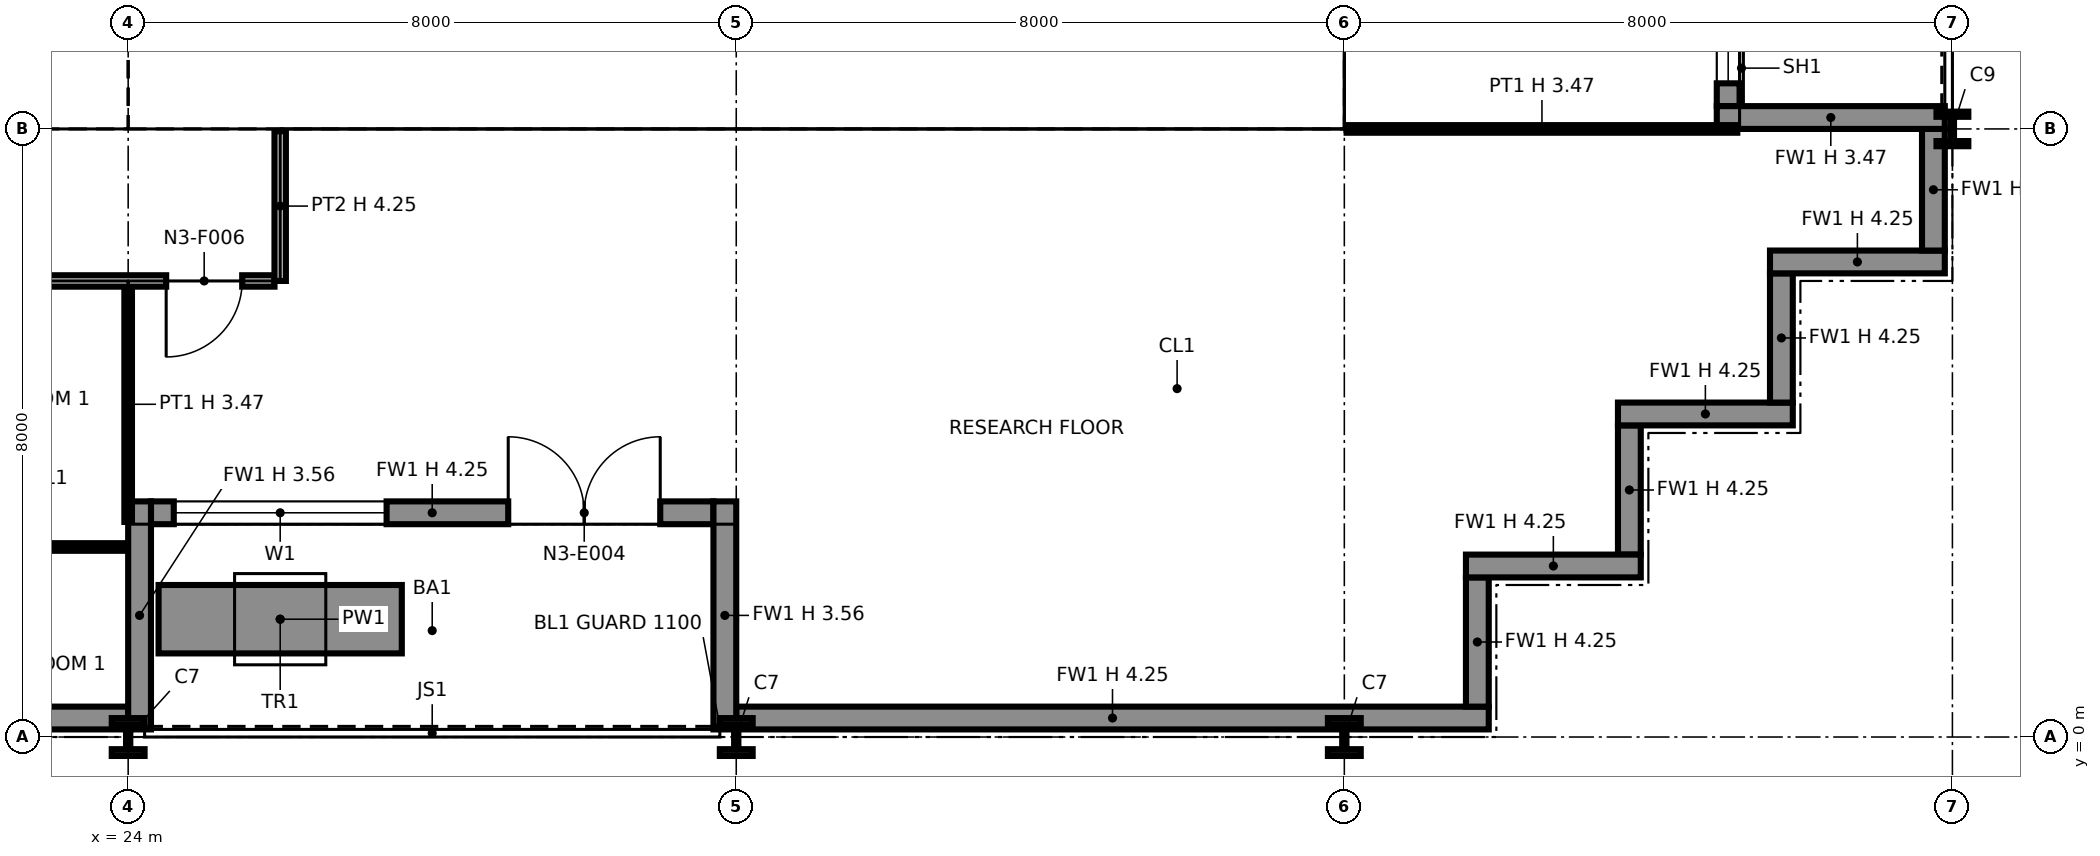
"""IFC4 building model, lengths in metres.
Left out: names, types, materials, properties, quantities, classifications, styles, units other than length and angle.
Written with IfcOpenShell. Run it as: python <this file> out.ifc"""

import sys

from ifc_helpers import new_model, si_unit, direction, frame, frame_2d, origin, origin_2d, place, context, subcontext, project, spatial, polyline, rectangle, i_section, outline, extrude, element, fill, save


model = new_model("IFC4")
c1 = context("Model", 3, precision=1e-05, world=origin(), true_north=direction((0.0, 1.0)))
c2 = subcontext(c1, "Body", "Model", "MODEL_VIEW")
j1 = project(units=[si_unit("LENGTHUNIT", "METRE"), si_unit("PLANEANGLEUNIT", "RADIAN")], contexts=[c1])
p1 = place(None, origin())
s1 = spatial("IfcSite", under=j1, at=p1, CompositionType="ELEMENT")
p2 = place(p1, origin())
s2 = spatial("IfcBuilding", under=s1, at=p2, CompositionType="ELEMENT")
p3 = place(p2, frame((0.0, 0.0, 70.0)))
s3 = spatial("IfcBuildingStorey", under=s2, at=p3, CompositionType="ELEMENT", Elevation=70.0)
p4 = place(p3, frame((24.0, 0.0, 0.0), z_axis=(0.0, 0.0, 1.0), x_axis=(1.0, 0.0, 0.0)))
e1 = element("IfcColumn", 1, at=p4, inside=s3, PredefinedType="COLUMN", context=c2, shape_type="SweptSolid", body=[
    extrude(i_section(OverallWidth=0.432, OverallDepth=0.498, WebThickness=0.056, FlangeThickness=0.089, at=origin_2d()), origin(), (0.0, 0.0, 1.0), 4.25),
])
p5 = place(p3, frame((24.0, 8.0, 0.0), z_axis=(0.0, 0.0, 1.0), x_axis=(1.0, 0.0, 0.0)))
e2 = element("IfcColumn", 2, at=p5, inside=s3, PredefinedType="COLUMN", context=c2, shape_type="SweptSolid", body=[
    extrude(i_section(OverallWidth=0.411, OverallDepth=0.434, WebThickness=0.036, FlangeThickness=0.057, at=origin_2d()), origin(), (0.0, 0.0, 1.0), 4.25),
])
p6 = place(p3, frame((32.0, 0.0, 0.0), z_axis=(0.0, 0.0, 1.0), x_axis=(1.0, 0.0, 0.0)))
e3 = element("IfcColumn", 3, at=p6, inside=s3, PredefinedType="COLUMN", context=c2, shape_type="SweptSolid", body=[
    extrude(i_section(OverallWidth=0.432, OverallDepth=0.498, WebThickness=0.056, FlangeThickness=0.089, at=origin_2d()), origin(), (0.0, 0.0, 1.0), 4.25),
])
p7 = place(p3, frame((32.0, 8.0, 0.0), z_axis=(0.0, 0.0, 1.0), x_axis=(1.0, 0.0, 0.0)))
e4 = element("IfcColumn", 4, at=p7, inside=s3, PredefinedType="COLUMN", context=c2, shape_type="SweptSolid", body=[
    extrude(i_section(OverallWidth=0.406, OverallDepth=0.417, WebThickness=0.03, FlangeThickness=0.048, at=origin_2d()), origin(), (0.0, 0.0, 1.0), 4.25),
])
p8 = place(p3, frame((40.0, 0.0, 0.0), z_axis=(0.0, 0.0, 1.0), x_axis=(1.0, 0.0, 0.0)))
e5 = element("IfcColumn", 5, at=p8, inside=s3, PredefinedType="COLUMN", context=c2, shape_type="SweptSolid", body=[
    extrude(i_section(OverallWidth=0.432, OverallDepth=0.498, WebThickness=0.056, FlangeThickness=0.089, at=origin_2d()), origin(), (0.0, 0.0, 1.0), 4.25),
])
p9 = place(p3, frame((40.0, 8.0, 0.0), z_axis=(0.0, 0.0, 1.0), x_axis=(1.0, 0.0, 0.0)))
e6 = element("IfcColumn", 6, at=p9, inside=s3, PredefinedType="COLUMN", context=c2, shape_type="SweptSolid", body=[
    extrude(i_section(OverallWidth=0.406, OverallDepth=0.417, WebThickness=0.03, FlangeThickness=0.048, at=origin_2d()), origin(), (0.0, 0.0, 1.0), 4.25),
])
p10 = place(p3, frame((48.0, 8.0, 0.0), z_axis=(0.0, 0.0, 1.0), x_axis=(1.0, 0.0, 0.0)))
e7 = element("IfcColumn", 7, at=p10, inside=s3, PredefinedType="COLUMN", context=c2, shape_type="SweptSolid", body=[
    extrude(i_section(OverallWidth=0.419, OverallDepth=0.455, WebThickness=0.042, FlangeThickness=0.068, at=origin_2d()), origin(), (0.0, 0.0, 1.0), 4.25),
])
p11 = place(p3, frame((16.0, 0.25, 0.0), z_axis=(0.0, 0.0, 1.0), x_axis=(1.0, 0.0, 0.0)))
e8 = element("IfcWall", 8, at=p11, inside=s3, PredefinedType="SOLIDWALL", context=c2, shape_type="SweptSolid", body=[
    extrude(rectangle(XDim=8.0, YDim=0.3, at=frame_2d((4.0, 0.0))), origin(), (0.0, 0.0, 1.0), 4.25),
])
p12 = place(p3, frame((24.3, 2.95, 0.0), z_axis=(0.0, 0.0, 1.0), x_axis=(1.0, 0.0, 0.0)))
e9 = element("IfcWall", 9, at=p12, inside=s3, PredefinedType="SOLIDWALL", context=c2, shape_type="SweptSolid", body=[
    extrude(rectangle(XDim=7.4, YDim=0.3, at=frame_2d((3.7, 0.0))), origin(), (0.0, 0.0, 1.0), 4.25),
])
p13 = place(p12, frame((0.3, 0.0, 0.9)))
e10 = element("IfcOpeningElement", 10, at=p13, cuts=e9, PredefinedType="OPENING", context=c2, shape_type="SweptSolid", body=[
    extrude(rectangle(XDim=2.8, YDim=2.2, at=frame_2d((1.4, 1.1))), frame((0.0, 0.16, 0.0), z_axis=(0.0, -1.0, 0.0), x_axis=(1.0, 0.0, 0.0)), (0.0, 0.0, 1.0), 0.32),
])
p14 = place(p12, frame((4.7, 0.0, 0.0)))
e11 = element("IfcOpeningElement", 11, at=p14, cuts=e9, PredefinedType="OPENING", context=c2, shape_type="SweptSolid", body=[
    extrude(rectangle(XDim=2.0, YDim=2.4, at=frame_2d((1.0, 1.2))), frame((0.0, 0.16, 0.0), z_axis=(0.0, -1.0, 0.0), x_axis=(1.0, 0.0, 0.0)), (0.0, 0.0, 1.0), 0.32),
])
for number, where, z_axis, x_axis in (
    (12, (24.15, 0.1, 0.0), (0.0, 0.0, 1.0), (0.0, 1.0, 0.0)),
    (13, (31.85, 0.1, 0.0), (0.0, 0.0, 1.0), (0.0, 1.0, 0.0)),
):
    element("IfcWall", number, at=place(p3, frame(where, z_axis=z_axis, x_axis=x_axis)), inside=s3, PredefinedType="SOLIDWALL", context=c2, shape_type="SweptSolid", body=[
        extrude(rectangle(XDim=3.0, YDim=0.3, at=frame_2d((1.5, 0.0))), origin(), (0.0, 0.0, 1.0), 3.556),
    ])
p15 = place(p3, frame((32.0, 0.25, 0.0), z_axis=(0.0, 0.0, 1.0), x_axis=(1.0, 0.0, 0.0)))
e14 = element("IfcWall", 14, at=p15, inside=s3, PredefinedType="SOLIDWALL", context=c2, shape_type="SweptSolid", body=[
    extrude(rectangle(XDim=9.9, YDim=0.3, at=frame_2d((4.95, 0.0))), origin(), (0.0, 0.0, 1.0), 4.25),
])
p16 = place(p3, frame((24.4, 1.55, 0.0), z_axis=(0.0, 0.0, 1.0), x_axis=(1.0, 0.0, 0.0)))
e15 = element("IfcWall", 15, at=p16, inside=s3, PredefinedType="SOLIDWALL", context=c2, shape_type="SweptSolid", body=[
    extrude(rectangle(XDim=3.2, YDim=0.9, at=frame_2d((1.6, 0.0))), origin(), (0.0, 0.0, 1.0), 0.6),
])
p17 = place(p3, frame((41.75, 0.4, 0.0), z_axis=(0.0, 0.0, 1.0), x_axis=(0.0, 1.0, 0.0)))
e16 = element("IfcWall", 16, at=p17, inside=s3, PredefinedType="SOLIDWALL", context=c2, shape_type="SweptSolid", body=[
    extrude(rectangle(XDim=1.7, YDim=0.3, at=frame_2d((0.85, 0.0))), origin(), (0.0, 0.0, 1.0), 4.25),
])
p18 = place(p3, frame((41.6, 2.25, 0.0), z_axis=(0.0, 0.0, 1.0), x_axis=(1.0, 0.0, 0.0)))
e17 = element("IfcWall", 17, at=p18, inside=s3, PredefinedType="SOLIDWALL", context=c2, shape_type="SweptSolid", body=[
    extrude(rectangle(XDim=2.3, YDim=0.3, at=frame_2d((1.15, 0.0))), origin(), (0.0, 0.0, 1.0), 4.25),
])
p19 = place(p3, frame((43.75, 2.4, 0.0), z_axis=(0.0, 0.0, 1.0), x_axis=(0.0, 1.0, 0.0)))
e18 = element("IfcWall", 18, at=p19, inside=s3, PredefinedType="SOLIDWALL", context=c2, shape_type="SweptSolid", body=[
    extrude(rectangle(XDim=1.7, YDim=0.3, at=frame_2d((0.85, 0.0))), origin(), (0.0, 0.0, 1.0), 4.25),
])
p20 = place(p3, frame((43.6, 4.25, 0.0), z_axis=(0.0, 0.0, 1.0), x_axis=(1.0, 0.0, 0.0)))
e19 = element("IfcWall", 19, at=p20, inside=s3, PredefinedType="SOLIDWALL", context=c2, shape_type="SweptSolid", body=[
    extrude(rectangle(XDim=2.3, YDim=0.3, at=frame_2d((1.15, 0.0))), origin(), (0.0, 0.0, 1.0), 4.25),
])
p21 = place(p3, frame((45.75, 4.4, 0.0), z_axis=(0.0, 0.0, 1.0), x_axis=(0.0, 1.0, 0.0)))
e20 = element("IfcWall", 20, at=p21, inside=s3, PredefinedType="SOLIDWALL", context=c2, shape_type="SweptSolid", body=[
    extrude(rectangle(XDim=1.7, YDim=0.3, at=frame_2d((0.85, 0.0))), origin(), (0.0, 0.0, 1.0), 4.25),
])
p22 = place(p3, frame((45.6, 6.25, 0.0), z_axis=(0.0, 0.0, 1.0), x_axis=(1.0, 0.0, 0.0)))
e21 = element("IfcWall", 21, at=p22, inside=s3, PredefinedType="SOLIDWALL", context=c2, shape_type="SweptSolid", body=[
    extrude(rectangle(XDim=2.3, YDim=0.3, at=frame_2d((1.15, 0.0))), origin(), (0.0, 0.0, 1.0), 4.25),
])
p23 = place(p3, frame((47.75, 6.4, 0.0), z_axis=(0.0, 0.0, 1.0), x_axis=(0.0, 1.0, 0.0)))
e22 = element("IfcWall", 22, at=p23, inside=s3, PredefinedType="SOLIDWALL", context=c2, shape_type="SweptSolid", body=[
    extrude(rectangle(XDim=1.6, YDim=0.3, at=frame_2d((0.8, 0.0))), origin(), (0.0, 0.0, 1.0), 4.25),
])
p24 = place(p3, frame((45.05, 8.3, 0.0), z_axis=(0.0, 0.0, 1.0), x_axis=(0.0, 1.0, 0.0)))
e23 = element("IfcWall", 23, at=p24, inside=s3, PredefinedType="SOLIDWALL", context=c2, shape_type="SweptSolid", body=[
    extrude(rectangle(XDim=7.4, YDim=0.3, at=frame_2d((3.7, 0.0))), origin(), (0.0, 0.0, 1.0), 4.25),
])
p25 = place(p24, frame((0.3, 0.0, 0.9)))
e24 = element("IfcOpeningElement", 24, at=p25, cuts=e23, PredefinedType="OPENING", context=c2, shape_type="SweptSolid", body=[
    extrude(rectangle(XDim=2.8, YDim=2.2, at=frame_2d((1.4, 1.1))), frame((0.0, 0.16, 0.0), z_axis=(0.0, -1.0, 0.0), x_axis=(1.0, 0.0, 0.0)), (0.0, 0.0, 1.0), 0.32),
])
p26 = place(p24, frame((4.7, 0.0, 0.0)))
e25 = element("IfcOpeningElement", 25, at=p26, cuts=e23, PredefinedType="OPENING", context=c2, shape_type="SweptSolid", body=[
    extrude(rectangle(XDim=2.0, YDim=2.4, at=frame_2d((1.0, 1.2))), frame((0.0, 0.16, 0.0), z_axis=(0.0, -1.0, 0.0), x_axis=(1.0, 0.0, 0.0)), (0.0, 0.0, 1.0), 0.32),
])
p27 = place(p3, frame((47.9, 8.15, 0.0), z_axis=(0.0, 0.0, 1.0), x_axis=(-1.0, 0.0, 0.0)))
e26 = element("IfcWall", 26, at=p27, inside=s3, PredefinedType="SOLIDWALL", context=c2, shape_type="SweptSolid", body=[
    extrude(rectangle(XDim=3.0, YDim=0.3, at=frame_2d((1.5, 0.0))), origin(), (0.0, 0.0, 1.0), 3.469),
])
p28 = place(p3, frame((8.65, 8.75, 0.0), z_axis=(0.0, 0.0, 1.0), x_axis=(1.0, 0.0, 0.0)))
e27 = element("IfcWall", 27, at=p28, inside=s3, PredefinedType="PARTITIONING", context=c2, shape_type="SweptSolid", body=[
    extrude(outline(polyline([(0.0, 0.0), (14.7, 0.0), (14.7, 4.25), (7.469, 4.25), (7.469, 3.632), (7.231, 3.632), (7.23, 4.25), (0.0, 4.25), (0.0, 0.0)])), frame((0.0, 0.1, 0.0), z_axis=(0.0, -1.0, 0.0), x_axis=(1.0, 0.0, 0.0)), (0.0, 0.0, 1.0), 0.2),
])
p29 = place(p28, frame((1.3, 0.0, 0.0)))
e28 = element("IfcOpeningElement", 28, at=p29, cuts=e27, PredefinedType="OPENING", context=c2, shape_type="SweptSolid", body=[
    extrude(rectangle(XDim=1.4, YDim=2.1, at=frame_2d((0.7, 1.05))), frame((0.0, 0.11, 0.0), z_axis=(0.0, -1.0, 0.0), x_axis=(1.0, 0.0, 0.0)), (0.0, 0.0, 1.0), 0.22),
])
p30 = place(p28, frame((4.6, 0.0, 0.0)))
e29 = element("IfcOpeningElement", 29, at=p30, cuts=e27, PredefinedType="OPENING", context=c2, shape_type="SweptSolid", body=[
    extrude(rectangle(XDim=1.4, YDim=2.1, at=frame_2d((0.7, 1.05))), frame((0.0, 0.11, 0.0), z_axis=(0.0, -1.0, 0.0), x_axis=(1.0, 0.0, 0.0)), (0.0, 0.0, 1.0), 0.22),
])
p31 = place(p28, frame((10.4, 0.0, 0.0)))
e30 = element("IfcOpeningElement", 30, at=p31, cuts=e27, PredefinedType="OPENING", context=c2, shape_type="SweptSolid", body=[
    extrude(rectangle(XDim=1.2, YDim=2.1, at=frame_2d((0.6, 1.05))), frame((0.0, 0.11, 0.0), z_axis=(0.0, -1.0, 0.0), x_axis=(1.0, 0.0, 0.0)), (0.0, 0.0, 1.0), 0.22),
])
p32 = place(p3, frame((23.25, 8.85, 0.0), z_axis=(0.0, 0.0, 1.0), x_axis=(0.0, 1.0, 0.0)))
e31 = element("IfcWall", 31, at=p32, inside=s3, PredefinedType="PARTITIONING", context=c2, shape_type="SweptSolid", body=[
    extrude(outline(polyline([(0.0, 0.0), (14.3, 0.0), (14.3, 4.25), (11.231, 4.25), (11.23, 3.789), (11.07, 3.789), (11.069, 4.25), (7.27, 4.25), (7.269, 3.632), (7.031, 3.632), (7.031, 4.25), (1.231, 4.25), (1.23, 3.789), (1.07, 3.789), (1.069, 4.25), (0.0, 4.25), (0.0, 0.0)])), frame((0.0, 0.1, 0.0), z_axis=(0.0, -1.0, 0.0), x_axis=(1.0, 0.0, 0.0)), (0.0, 0.0, 1.0), 0.2),
])
p33 = place(p32, frame((8.3, 0.0, 0.0)))
e32 = element("IfcOpeningElement", 32, at=p33, cuts=e31, PredefinedType="OPENING", context=c2, shape_type="SweptSolid", body=[
    extrude(rectangle(XDim=1.8, YDim=2.1, at=frame_2d((0.9, 1.05))), frame((0.0, 0.11, 0.0), z_axis=(0.0, -1.0, 0.0), x_axis=(1.0, 0.0, 0.0)), (0.0, 0.0, 1.0), 0.22),
])
p34 = place(p3, frame((24.65, 8.75, 0.0), z_axis=(0.0, 0.0, 1.0), x_axis=(1.0, 0.0, 0.0)))
e33 = element("IfcWall", 33, at=p34, inside=s3, PredefinedType="PARTITIONING", context=c2, shape_type="SweptSolid", body=[
    extrude(outline(polyline([(0.0, 0.0), (14.7, 0.0), (14.7, 4.25), (7.469, 4.25), (7.469, 3.632), (7.231, 3.632), (7.23, 4.25), (0.0, 4.25), (0.0, 0.0)])), frame((0.0, 0.1, 0.0), z_axis=(0.0, -1.0, 0.0), x_axis=(1.0, 0.0, 0.0)), (0.0, 0.0, 1.0), 0.2),
])
p35 = place(p3, frame((24.75, 8.85, 0.0), z_axis=(0.0, 0.0, 1.0), x_axis=(0.0, 1.0, 0.0)))
e34 = element("IfcWall", 34, at=p35, inside=s3, PredefinedType="PARTITIONING", context=c2, shape_type="SweptSolid", body=[
    extrude(outline(polyline([(0.0, 0.0), (6.3, 0.0), (6.3, 4.25), (3.231, 4.25), (3.23, 3.789), (3.07, 3.789), (3.069, 4.25), (0.0, 4.25), (0.0, 0.0)])), frame((0.0, 0.1, 0.0), z_axis=(0.0, -1.0, 0.0), x_axis=(1.0, 0.0, 0.0)), (0.0, 0.0, 1.0), 0.2),
])
for number, where, z_axis, x_axis in (
    (35, (27.075, 8.85, 0.0), (0.0, 0.0, 1.0), (0.0, 1.0, 0.0)),
    (36, (29.225, 8.85, 0.0), (0.0, 0.0, 1.0), (0.0, 1.0, 0.0)),
):
    element("IfcWall", number, at=place(p3, frame(where, z_axis=z_axis, x_axis=x_axis)), inside=s3, PredefinedType="PARTITIONING", context=c2, shape_type="SweptSolid", body=[
        extrude(rectangle(XDim=3.0, YDim=0.15, at=frame_2d((1.5, 0.0))), origin(), (0.0, 0.0, 1.0), 4.25),
    ])
p36 = place(p3, frame((32.0, 8.85, 0.0), z_axis=(0.0, 0.0, 1.0), x_axis=(0.0, 1.0, 0.0)))
e37 = element("IfcWall", 37, at=p36, inside=s3, PredefinedType="PARTITIONING", context=c2, shape_type="SweptSolid", body=[
    extrude(rectangle(XDim=3.0, YDim=0.6, at=frame_2d((1.5, 0.0))), origin(), (0.0, 0.0, 1.0), 3.632),
])
for number, where, z_axis, x_axis in (
    (38, (35.6, 8.85, 0.0), (0.0, 0.0, 1.0), (0.0, 1.0, 0.0)),
    (39, (39.25, 8.85, 0.0), (0.0, 0.0, 1.0), (0.0, 1.0, 0.0)),
):
    element("IfcWall", number, at=place(p3, frame(where, z_axis=z_axis, x_axis=x_axis)), inside=s3, PredefinedType="PARTITIONING", context=c2, shape_type="SweptSolid", body=[
        extrude(rectangle(XDim=6.3, YDim=0.2, at=frame_2d((3.15, 0.0))), origin(), (0.0, 0.0, 1.0), 4.25),
    ])
p37 = place(p3, frame((20.05, 2.5, 0.0), z_axis=(0.0, 0.0, 1.0), x_axis=(1.0, 0.0, 0.0)))
e40 = element("IfcWall", 40, at=p37, inside=s3, PredefinedType="PARTITIONING", context=c2, shape_type="SweptSolid", body=[
    extrude(rectangle(XDim=3.92, YDim=0.1, at=frame_2d((1.96, 0.0))), origin(), (0.0, 0.0, 1.0), 4.25),
])
p38 = place(p37, frame((1.45, 0.0, 0.0)))
e41 = element("IfcOpeningElement", 41, at=p38, cuts=e40, PredefinedType="OPENING", context=c2, shape_type="SweptSolid", body=[
    extrude(rectangle(XDim=1.0, YDim=2.1, at=frame_2d((0.5, 1.05))), frame((0.0, 0.06, 0.0), z_axis=(0.0, -1.0, 0.0), x_axis=(1.0, 0.0, 0.0)), (0.0, 0.0, 1.0), 0.12),
])
p39 = place(p3, frame((24.0, 2.83, 0.0), z_axis=(0.0, 0.0, 1.0), x_axis=(0.0, 1.0, 0.0)))
e42 = element("IfcWall", 42, at=p39, inside=s3, PredefinedType="PARTITIONING", context=c2, shape_type="SweptSolid", body=[
    extrude(rectangle(XDim=3.095, YDim=0.1, at=frame_2d((1.547, 0.0))), origin(), (0.0, 0.0, 1.0), 3.47),
])
p40 = place(p3, frame((6.075, 6.0, 0.0), z_axis=(0.0, 0.0, 1.0), x_axis=(1.0, 0.0, 0.0)))
e43 = element("IfcWall", 43, at=p40, inside=s3, PredefinedType="PARTITIONING", context=c2, shape_type="SweptSolid", body=[
    extrude(rectangle(XDim=19.85, YDim=0.15, at=frame_2d((9.925, 0.0))), origin(), (0.0, 0.0, 1.0), 4.25),
])
p41 = place(p40, frame((12.425, 0.0, 0.0), z_axis=(0.0, 0.0, 1.0), x_axis=(-1.0, 0.0, 0.0)))
e44 = element("IfcOpeningElement", 44, at=p41, cuts=e43, PredefinedType="OPENING", context=c2, shape_type="SweptSolid", body=[
    extrude(rectangle(XDim=1.0, YDim=2.1, at=frame_2d((0.5, 1.05))), frame((0.0, 0.085, 0.0), z_axis=(0.0, -1.0, 0.0), x_axis=(1.0, 0.0, 0.0)), (0.0, 0.0, 1.0), 0.17),
])
p42 = place(p40, frame((16.425, 0.0, 0.0), z_axis=(0.0, 0.0, 1.0), x_axis=(-1.0, 0.0, 0.0)))
e45 = element("IfcOpeningElement", 45, at=p42, cuts=e43, PredefinedType="OPENING", context=c2, shape_type="SweptSolid", body=[
    extrude(rectangle(XDim=1.0, YDim=2.1, at=frame_2d((0.5, 1.05))), frame((0.0, 0.085, 0.0), z_axis=(0.0, -1.0, 0.0), x_axis=(1.0, 0.0, 0.0)), (0.0, 0.0, 1.0), 0.17),
])
p43 = place(p40, frame((4.425, 0.0, 0.0), z_axis=(0.0, 0.0, 1.0), x_axis=(-1.0, 0.0, 0.0)))
e46 = element("IfcOpeningElement", 46, at=p43, cuts=e43, PredefinedType="OPENING", context=c2, shape_type="SweptSolid", body=[
    extrude(rectangle(XDim=1.0, YDim=2.1, at=frame_2d((0.5, 1.05))), frame((0.0, 0.085, 0.0), z_axis=(0.0, -1.0, 0.0), x_axis=(1.0, 0.0, 0.0)), (0.0, 0.0, 1.0), 0.17),
])
p44 = place(p40, frame((8.425, 0.0, 0.0), z_axis=(0.0, 0.0, 1.0), x_axis=(-1.0, 0.0, 0.0)))
e47 = element("IfcOpeningElement", 47, at=p44, cuts=e43, PredefinedType="OPENING", context=c2, shape_type="SweptSolid", body=[
    extrude(rectangle(XDim=1.0, YDim=2.1, at=frame_2d((0.5, 1.05))), frame((0.0, 0.085, 0.0), z_axis=(0.0, -1.0, 0.0), x_axis=(1.0, 0.0, 0.0)), (0.0, 0.0, 1.0), 0.17),
])
p45 = place(p40, frame((19.425, 0.0, 0.0), z_axis=(0.0, 0.0, 1.0), x_axis=(-1.0, 0.0, 0.0)))
e48 = element("IfcOpeningElement", 48, at=p45, cuts=e43, PredefinedType="OPENING", context=c2, shape_type="SweptSolid", body=[
    extrude(rectangle(XDim=1.0, YDim=2.1, at=frame_2d((0.5, 1.05))), frame((0.0, 0.085, 0.0), z_axis=(0.0, -1.0, 0.0), x_axis=(1.0, 0.0, 0.0)), (0.0, 0.0, 1.0), 0.17),
])
p46 = place(p3, frame((26.0, 6.0, 0.0), z_axis=(0.0, 0.0, 1.0), x_axis=(0.0, 1.0, 0.0)))
e49 = element("IfcWall", 49, at=p46, inside=s3, PredefinedType="PARTITIONING", context=c2, shape_type="SweptSolid", body=[
    extrude(rectangle(XDim=1.97, YDim=0.15, at=frame_2d((0.985, 0.0))), origin(), (0.0, 0.0, 1.0), 4.25),
])
p47 = place(p3, frame((40.03, 8.0, 0.0), z_axis=(0.0, 0.0, 1.0), x_axis=(1.0, 0.0, 0.0)))
e50 = element("IfcWall", 50, at=p47, inside=s3, PredefinedType="PARTITIONING", context=c2, shape_type="SweptSolid", body=[
    extrude(rectangle(XDim=5.14, YDim=0.1, at=frame_2d((2.57, 0.0))), origin(), (0.0, 0.0, 1.0), 3.47),
])
p48 = place(p13, origin())
e51 = element("IfcWindow", 51, at=p48, inside=s3, PartitioningType="SINGLE_PANEL", PredefinedType="WINDOW", context=c2, shape_type="SweptSolid", body=[
    extrude(rectangle(XDim=2.8, YDim=2.2, at=frame_2d((1.4, 1.1))), frame((0.0, 0.03, 0.0), z_axis=(0.0, -1.0, 0.0), x_axis=(1.0, 0.0, 0.0)), (0.0, 0.0, 1.0), 0.06),
])
fill(e10, e51)
p49 = place(p14, origin())
e52 = element("IfcDoor", 52, at=p49, inside=s3, OperationType="DOUBLE_DOOR_SINGLE_SWING", PredefinedType="DOOR", context=c2, shape_type="SweptSolid", body=[
    extrude(rectangle(XDim=2.0, YDim=2.4, at=frame_2d((1.0, 1.2))), frame((0.0, 0.025, 0.0), z_axis=(0.0, -1.0, 0.0), x_axis=(1.0, 0.0, 0.0)), (0.0, 0.0, 1.0), 0.05),
])
fill(e11, e52)
p50 = place(p25, origin())
e53 = element("IfcWindow", 53, at=p50, inside=s3, PartitioningType="SINGLE_PANEL", PredefinedType="WINDOW", context=c2, shape_type="SweptSolid", body=[
    extrude(rectangle(XDim=2.8, YDim=2.2, at=frame_2d((1.4, 1.1))), frame((0.0, 0.03, 0.0), z_axis=(0.0, -1.0, 0.0), x_axis=(1.0, 0.0, 0.0)), (0.0, 0.0, 1.0), 0.06),
])
fill(e24, e53)
p51 = place(p45, origin())
e54 = element("IfcDoor", 54, at=p51, inside=s3, OperationType="SINGLE_SWING_RIGHT", PredefinedType="DOOR", context=c2, shape_type="SweptSolid", body=[
    extrude(rectangle(XDim=1.0, YDim=2.1, at=frame_2d((0.5, 1.05))), frame((0.0, 0.025, 0.0), z_axis=(0.0, -1.0, 0.0), x_axis=(1.0, 0.0, 0.0)), (0.0, 0.0, 1.0), 0.05),
])
fill(e48, e54)
save(model, sys.argv[1])
